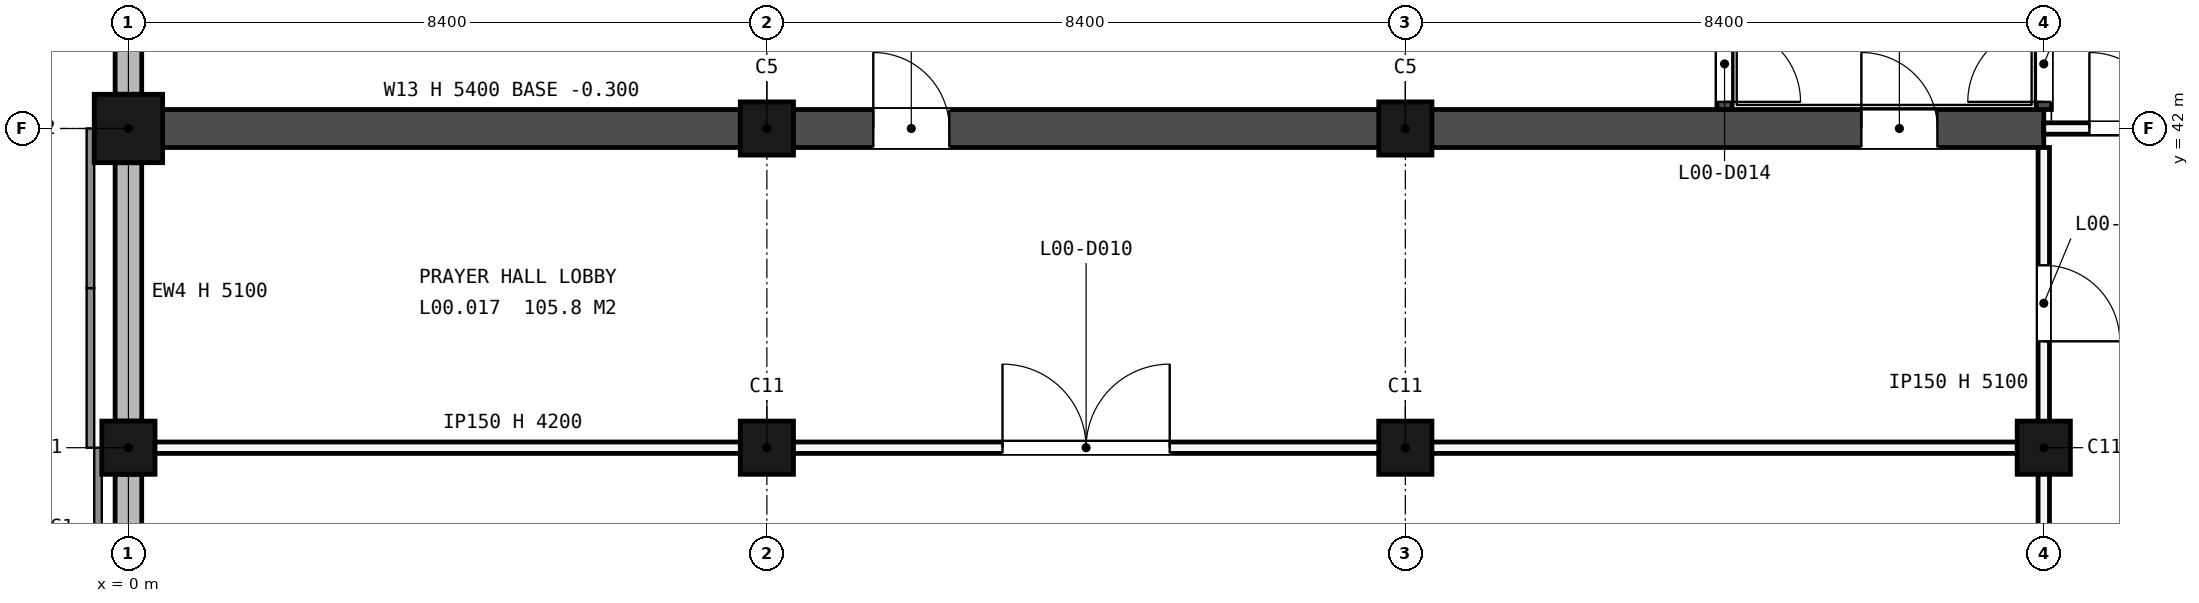
"""IFC4 building model, lengths in metres.
Left out: names, types, materials, properties, quantities, classifications, styles, units other than length and angle.
Written with IfcOpenShell. Run it as: python <this file> out.ifc"""

import sys

from ifc_helpers import new_model, si_unit, direction, frame, frame_2d, origin, origin_2d, place, context, subcontext, project, spatial, rectangle, circle, extrude, element, fill, save


model = new_model("IFC4")
c1 = context("Model", 3, precision=1e-05, world=origin(), true_north=direction((0.0, 1.0)))
c2 = subcontext(c1, "Body", "Model", "MODEL_VIEW")
j1 = project(units=[si_unit("LENGTHUNIT", "METRE"), si_unit("PLANEANGLEUNIT", "RADIAN")], contexts=[c1])
p1 = place(None, origin())
s1 = spatial("IfcSite", under=j1, at=p1, CompositionType="ELEMENT")
p2 = place(p1, origin())
s2 = spatial("IfcBuilding", under=s1, at=p2, CompositionType="ELEMENT")
p3 = place(p2, origin())
s3 = spatial("IfcBuildingStorey", under=s2, at=p3, CompositionType="ELEMENT", Elevation=0.0)
p4 = place(p3, frame((0.0, 42.0, -0.3), z_axis=(0.0, 0.0, 1.0), x_axis=(1.0, 0.0, 0.0)))
e1 = element("IfcColumn", 1, at=p4, inside=s3, PredefinedType="COLUMN", context=c2, shape_type="SweptSolid", body=[
    extrude(rectangle(XDim=0.9, YDim=0.9, at=origin_2d()), origin(), (0.0, 0.0, 1.0), 5.4),
])
for number, where, z_axis, x_axis in (
    (2, (8.4, 42.0, -0.3), (0.0, 0.0, 1.0), (1.0, 0.0, 0.0)),
    (3, (16.8, 42.0, -0.3), (0.0, 0.0, 1.0), (1.0, 0.0, 0.0)),
):
    element("IfcColumn", number, at=place(p3, frame(where, z_axis=z_axis, x_axis=x_axis)), inside=s3, PredefinedType="COLUMN", context=c2, shape_type="SweptSolid", body=[
        extrude(rectangle(XDim=0.7, YDim=0.7, at=origin_2d()), origin(), (0.0, 0.0, 1.0), 5.4),
    ])
for number, where, z_axis, x_axis in (
    (4, (0.0, 37.8, -0.3), (0.0, 0.0, 1.0), (1.0, 0.0, 0.0)),
    (5, (8.4, 37.8, -0.3), (0.0, 0.0, 1.0), (1.0, 0.0, 0.0)),
    (6, (16.8, 37.8, -0.3), (0.0, 0.0, 1.0), (1.0, 0.0, 0.0)),
    (7, (25.2, 37.8, -0.3), (0.0, 0.0, 1.0), (1.0, 0.0, 0.0)),
):
    element("IfcColumn", number, at=place(p3, frame(where, z_axis=z_axis, x_axis=x_axis)), inside=s3, PredefinedType="COLUMN", context=c2, shape_type="SweptSolid", body=[
        extrude(circle(Radius=0.35, at=origin_2d()), origin(), (0.0, 0.0, 1.0), 5.4),
    ])
p5 = place(p3, frame((0.0, 42.0, -0.3), z_axis=(0.0, 0.0, 1.0), x_axis=(1.0, 0.0, 0.0)))
e8 = element("IfcWall", 8, at=p5, inside=s3, PredefinedType="SHEAR", context=c2, shape_type="SweptSolid", body=[
    extrude(rectangle(XDim=25.2, YDim=0.5, at=frame_2d((12.6, 0.0))), origin(), (0.0, 0.0, 1.0), 5.4),
])
p6 = place(p5, frame((9.8, 0.0, 0.3)))
e9 = element("IfcOpeningElement", 9, at=p6, cuts=e8, PredefinedType="OPENING", context=c2, shape_type="SweptSolid", body=[
    extrude(rectangle(XDim=1.0, YDim=2.1, at=frame_2d((0.5, 1.05))), frame((0.0, 0.26, 0.0), z_axis=(0.0, -1.0, 0.0), x_axis=(1.0, 0.0, 0.0)), (0.0, 0.0, 1.0), 0.52),
])
p7 = place(p5, frame((22.8, 0.0, 0.3)))
e10 = element("IfcOpeningElement", 10, at=p7, cuts=e8, PredefinedType="OPENING", context=c2, shape_type="SweptSolid", body=[
    extrude(rectangle(XDim=1.0, YDim=2.1, at=frame_2d((0.5, 1.05))), frame((0.0, 0.26, 0.0), z_axis=(0.0, -1.0, 0.0), x_axis=(1.0, 0.0, 0.0)), (0.0, 0.0, 1.0), 0.52),
])
p8 = place(p3, frame((0.0, 8.85, 0.0), z_axis=(0.0, 0.0, 1.0), x_axis=(0.0, 1.0, 0.0)))
e11 = element("IfcWall", 11, at=p8, inside=s3, PredefinedType="STANDARD", context=c2, shape_type="SweptSolid", body=[
    extrude(rectangle(XDim=28.6, YDim=0.35, at=frame_2d((14.3, 0.0))), origin(), (0.0, 0.0, 1.0), 5.4),
])
p9 = place(p8, frame((2.7, 0.0, 0.0)))
e12 = element("IfcOpeningElement", 12, at=p9, cuts=e11, PredefinedType="OPENING", context=c2, shape_type="SweptSolid", body=[
    extrude(rectangle(XDim=2.1, YDim=2.2, at=frame_2d((1.05, 1.1))), frame((0.0, 0.185, 0.0), z_axis=(0.0, -1.0, 0.0), x_axis=(1.0, 0.0, 0.0)), (0.0, 0.0, 1.0), 0.37),
])
p10 = place(p8, frame((11.1, 0.0, 0.0)))
e13 = element("IfcOpeningElement", 13, at=p10, cuts=e11, PredefinedType="OPENING", context=c2, shape_type="SweptSolid", body=[
    extrude(rectangle(XDim=2.1, YDim=2.2, at=frame_2d((1.05, 1.1))), frame((0.0, 0.185, 0.0), z_axis=(0.0, -1.0, 0.0), x_axis=(1.0, 0.0, 0.0)), (0.0, 0.0, 1.0), 0.37),
])
p11 = place(p8, frame((19.5, 0.0, 0.0)))
e14 = element("IfcOpeningElement", 14, at=p11, cuts=e11, PredefinedType="OPENING", context=c2, shape_type="SweptSolid", body=[
    extrude(rectangle(XDim=2.1, YDim=2.2, at=frame_2d((1.05, 1.1))), frame((0.0, 0.185, 0.0), z_axis=(0.0, -1.0, 0.0), x_axis=(1.0, 0.0, 0.0)), (0.0, 0.0, 1.0), 0.37),
])
p12 = place(p3, frame((0.0, 38.15, 0.0), z_axis=(0.0, 0.0, 1.0), x_axis=(0.0, 1.0, 0.0)))
e15 = element("IfcWall", 15, at=p12, inside=s3, PredefinedType="STANDARD", context=c2, shape_type="SweptSolid", body=[
    extrude(rectangle(XDim=3.4, YDim=0.35, at=frame_2d((1.7, 0.0))), origin(), (0.0, 0.0, 1.0), 5.1),
])
p13 = place(p3, frame((0.0, 42.45, 0.0), z_axis=(0.0, 0.0, 1.0), x_axis=(0.0, 1.0, 0.0)))
e16 = element("IfcWall", 16, at=p13, inside=s3, PredefinedType="STANDARD", context=c2, shape_type="SweptSolid", body=[
    extrude(rectangle(XDim=7.5, YDim=0.35, at=frame_2d((3.75, 0.0))), origin(), (0.0, 0.0, 1.0), 4.45),
])
p14 = place(p13, frame((1.65, 0.0, 0.9)))
e17 = element("IfcOpeningElement", 17, at=p14, cuts=e16, PredefinedType="OPENING", context=c2, shape_type="SweptSolid", body=[
    extrude(rectangle(XDim=4.2, YDim=1.5, at=frame_2d((2.1, 0.75))), frame((0.0, 0.185, 0.0), z_axis=(0.0, -1.0, 0.0), x_axis=(1.0, 0.0, 0.0)), (0.0, 0.0, 1.0), 0.37),
])
p15 = place(p3, frame((21.0, 42.25, 0.0), z_axis=(0.0, 0.0, 1.0), x_axis=(0.0, 1.0, 0.0)))
e18 = element("IfcWall", 18, at=p15, inside=s3, PredefinedType="SHEAR", context=c2, shape_type="SweptSolid", body=[
    extrude(rectangle(XDim=7.775, YDim=0.2, at=frame_2d((3.887, 0.0))), origin(), (0.0, 0.0, 1.0), 5.1),
])
p16 = place(p15, frame((0.1, 0.0, 0.0)))
e19 = element("IfcOpeningElement", 19, at=p16, cuts=e18, PredefinedType="OPENING", context=c2, shape_type="SweptSolid", body=[
    extrude(rectangle(XDim=1.0, YDim=2.1, at=frame_2d((0.5, 1.05))), frame((0.0, 0.11, 0.0), z_axis=(0.0, -1.0, 0.0), x_axis=(1.0, 0.0, 0.0)), (0.0, 0.0, 1.0), 0.22),
])
p17 = place(p3, frame((25.2, 42.25, 0.0), z_axis=(0.0, 0.0, 1.0), x_axis=(0.0, 1.0, 0.0)))
e20 = element("IfcWall", 20, at=p17, inside=s3, PredefinedType="SHEAR", context=c2, shape_type="SweptSolid", body=[
    extrude(rectangle(XDim=7.775, YDim=0.2, at=frame_2d((3.887, 0.0))), origin(), (0.0, 0.0, 1.0), 5.1),
])
p18 = place(p17, frame((0.1, 0.0, 0.0)))
e21 = element("IfcOpeningElement", 21, at=p18, cuts=e20, PredefinedType="OPENING", context=c2, shape_type="SweptSolid", body=[
    extrude(rectangle(XDim=1.0, YDim=2.1, at=frame_2d((0.5, 1.05))), frame((0.0, 0.11, 0.0), z_axis=(0.0, -1.0, 0.0), x_axis=(1.0, 0.0, 0.0)), (0.0, 0.0, 1.0), 0.22),
])
p19 = place(p3, frame((0.0, 37.8, 0.0), z_axis=(0.0, 0.0, 1.0), x_axis=(1.0, 0.0, 0.0)))
e22 = element("IfcWall", 22, at=p19, inside=s3, PredefinedType="PARTITIONING", context=c2, shape_type="SweptSolid", body=[
    extrude(rectangle(XDim=25.275, YDim=0.15, at=frame_2d((12.637, 0.0))), origin(), (0.0, 0.0, 1.0), 4.2),
])
p20 = place(p19, frame((11.5, 0.0, 0.0)))
e23 = element("IfcOpeningElement", 23, at=p20, cuts=e22, PredefinedType="OPENING", context=c2, shape_type="SweptSolid", body=[
    extrude(rectangle(XDim=2.2, YDim=2.4, at=frame_2d((1.1, 1.2))), frame((0.0, 0.085, 0.0), z_axis=(0.0, -1.0, 0.0), x_axis=(1.0, 0.0, 0.0)), (0.0, 0.0, 1.0), 0.17),
])
p21 = place(p3, frame((25.2, 42.0, 0.0), z_axis=(0.0, 0.0, 1.0), x_axis=(1.0, 0.0, 0.0)))
e24 = element("IfcWall", 24, at=p21, inside=s3, PredefinedType="PARTITIONING", context=c2, shape_type="SweptSolid", body=[
    extrude(rectangle(XDim=12.5, YDim=0.15, at=frame_2d((6.25, 0.0))), origin(), (0.0, 0.0, 1.0), 5.1),
])
p22 = place(p21, frame((0.6, 0.0, 0.0)))
e25 = element("IfcOpeningElement", 25, at=p22, cuts=e24, PredefinedType="OPENING", context=c2, shape_type="SweptSolid", body=[
    extrude(rectangle(XDim=1.0, YDim=2.1, at=frame_2d((0.5, 1.05))), frame((0.0, 0.085, 0.0), z_axis=(0.0, -1.0, 0.0), x_axis=(1.0, 0.0, 0.0)), (0.0, 0.0, 1.0), 0.17),
])
p23 = place(p21, frame((6.9, 0.0, 0.0)))
e26 = element("IfcOpeningElement", 26, at=p23, cuts=e24, PredefinedType="OPENING", context=c2, shape_type="SweptSolid", body=[
    extrude(rectangle(XDim=1.0, YDim=2.1, at=frame_2d((0.5, 1.05))), frame((0.0, 0.085, 0.0), z_axis=(0.0, -1.0, 0.0), x_axis=(1.0, 0.0, 0.0)), (0.0, 0.0, 1.0), 0.17),
])
p24 = place(p3, frame((25.2, 33.17, 0.0), z_axis=(0.0, 0.0, 1.0), x_axis=(0.0, 1.0, 0.0)))
e27 = element("IfcWall", 27, at=p24, inside=s3, PredefinedType="PARTITIONING", context=c2, shape_type="SweptSolid", body=[
    extrude(rectangle(XDim=4.555, YDim=0.15, at=frame_2d((2.278, 0.0))), origin(), (0.0, 0.0, 1.0), 5.1),
])
p25 = place(p3, frame((25.2, 37.875, 0.0), z_axis=(0.0, 0.0, 1.0), x_axis=(0.0, 1.0, 0.0)))
e28 = element("IfcWall", 28, at=p25, inside=s3, PredefinedType="PARTITIONING", context=c2, shape_type="SweptSolid", body=[
    extrude(rectangle(XDim=3.875, YDim=0.15, at=frame_2d((1.938, 0.0))), origin(), (0.0, 0.0, 1.0), 5.1),
])
p26 = place(p25, frame((1.325, 0.0, 0.0)))
e29 = element("IfcOpeningElement", 29, at=p26, cuts=e28, PredefinedType="OPENING", context=c2, shape_type="SweptSolid", body=[
    extrude(rectangle(XDim=1.0, YDim=2.1, at=frame_2d((0.5, 1.05))), frame((0.0, 0.085, 0.0), z_axis=(0.0, -1.0, 0.0), x_axis=(1.0, 0.0, 0.0)), (0.0, 0.0, 1.0), 0.17),
])
p27 = place(p18, origin())
e30 = element("IfcDoor", 30, at=p27, inside=s3, OperationType="SINGLE_SWING_RIGHT", PredefinedType="DOOR", context=c2, shape_type="SweptSolid", body=[
    extrude(rectangle(XDim=1.0, YDim=2.1, at=frame_2d((0.5, 1.05))), frame((0.0, 0.025, 0.0), z_axis=(0.0, -1.0, 0.0), x_axis=(1.0, 0.0, 0.0)), (0.0, 0.0, 1.0), 0.05),
])
fill(e21, e30)
p28 = place(p16, origin())
e31 = element("IfcDoor", 31, at=p28, inside=s3, OperationType="SINGLE_SWING_LEFT", PredefinedType="DOOR", context=c2, shape_type="SweptSolid", body=[
    extrude(rectangle(XDim=1.0, YDim=2.1, at=frame_2d((0.5, 1.05))), frame((0.0, 0.025, 0.0), z_axis=(0.0, -1.0, 0.0), x_axis=(1.0, 0.0, 0.0)), (0.0, 0.0, 1.0), 0.05),
])
fill(e19, e31)
p29 = place(p20, origin())
e32 = element("IfcDoor", 32, at=p29, inside=s3, OperationType="DOUBLE_DOOR_SINGLE_SWING", PredefinedType="DOOR", context=c2, shape_type="SweptSolid", body=[
    extrude(rectangle(XDim=2.2, YDim=2.4, at=frame_2d((1.1, 1.2))), frame((0.0, 0.025, 0.0), z_axis=(0.0, -1.0, 0.0), x_axis=(1.0, 0.0, 0.0)), (0.0, 0.0, 1.0), 0.05),
])
fill(e23, e32)
p30 = place(p26, origin())
e33 = element("IfcDoor", 33, at=p30, inside=s3, OperationType="SINGLE_SWING_LEFT", PredefinedType="DOOR", context=c2, shape_type="SweptSolid", body=[
    extrude(rectangle(XDim=1.0, YDim=2.1, at=frame_2d((0.5, 1.05))), frame((0.0, 0.025, 0.0), z_axis=(0.0, -1.0, 0.0), x_axis=(1.0, 0.0, 0.0)), (0.0, 0.0, 1.0), 0.05),
])
fill(e29, e33)
p31 = place(p6, origin())
e34 = element("IfcDoor", 34, at=p31, inside=s3, OperationType="SINGLE_SWING_RIGHT", PredefinedType="DOOR", context=c2, shape_type="SweptSolid", body=[
    extrude(rectangle(XDim=1.0, YDim=2.1, at=frame_2d((0.5, 1.05))), frame((0.0, 0.025, 0.0), z_axis=(0.0, -1.0, 0.0), x_axis=(1.0, 0.0, 0.0)), (0.0, 0.0, 1.0), 0.05),
])
fill(e9, e34)
p32 = place(p7, origin())
e35 = element("IfcDoor", 35, at=p32, inside=s3, OperationType="SINGLE_SWING_RIGHT", PredefinedType="DOOR", context=c2, shape_type="SweptSolid", body=[
    extrude(rectangle(XDim=1.0, YDim=2.1, at=frame_2d((0.5, 1.05))), frame((0.0, 0.025, 0.0), z_axis=(0.0, -1.0, 0.0), x_axis=(1.0, 0.0, 0.0)), (0.0, 0.0, 1.0), 0.05),
])
fill(e10, e35)
p33 = place(p22, origin())
e36 = element("IfcDoor", 36, at=p33, inside=s3, OperationType="SINGLE_SWING_RIGHT", PredefinedType="DOOR", context=c2, shape_type="SweptSolid", body=[
    extrude(rectangle(XDim=1.0, YDim=2.1, at=frame_2d((0.5, 1.05))), frame((0.0, 0.025, 0.0), z_axis=(0.0, -1.0, 0.0), x_axis=(1.0, 0.0, 0.0)), (0.0, 0.0, 1.0), 0.05),
])
fill(e25, e36)
save(model, sys.argv[1])
